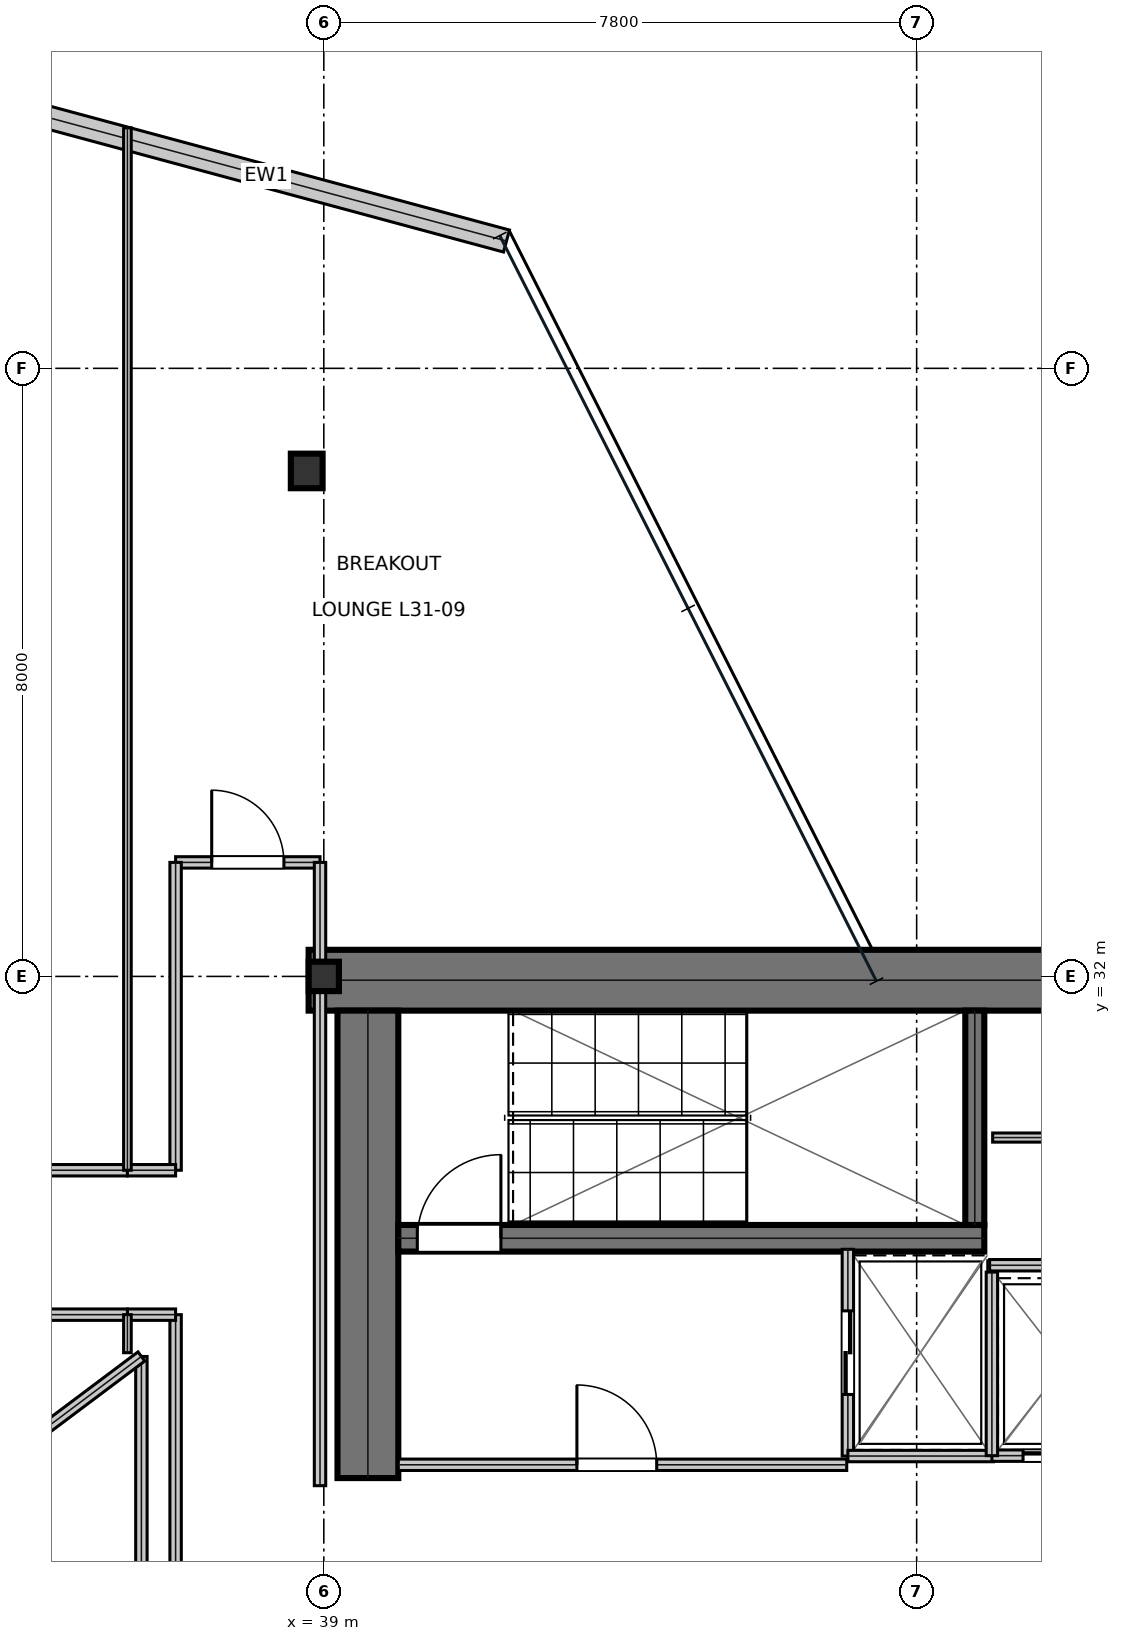
"""IFC4 building model, lengths in metres.
Left out: names, types, materials, properties, quantities, classifications, styles, units other than length and angle.
Written with IfcOpenShell. Run it as: python <this file> out.ifc"""

import sys

from ifc_helpers import new_model, si_unit, direction, frame, frame_2d, origin, origin_2d, place, context, subcontext, project, spatial, rectangle, i_section, extrude, element, fill, save


model = new_model("IFC4")
c1 = context("Model", 3, precision=1e-05, world=origin(), true_north=direction((0.0, 1.0)))
c2 = subcontext(c1, "Body", "Model", "MODEL_VIEW")
j1 = project(units=[si_unit("LENGTHUNIT", "METRE"), si_unit("PLANEANGLEUNIT", "RADIAN")], contexts=[c1])
p1 = place(None, origin())
s1 = spatial("IfcSite", under=j1, at=p1, CompositionType="ELEMENT")
p2 = place(p1, origin())
s2 = spatial("IfcBuilding", under=s1, at=p2, CompositionType="ELEMENT")
p3 = place(p2, frame((0.0, 0.0, 137.1)))
s3 = spatial("IfcBuildingStorey", under=s2, at=p3, CompositionType="ELEMENT", Elevation=137.1)
p4 = place(p3, frame((38.8, 31.95, 0.0), z_axis=(0.0, 0.0, 1.0), x_axis=(1.0, 0.0, 0.0)))
e1 = element("IfcWall", 1, at=p4, inside=s3, PredefinedType="SHEAR", context=c2, shape_type="SweptSolid", body=[
    extrude(rectangle(XDim=16.0, YDim=0.8, at=frame_2d((8.0, 0.0))), origin(), (0.0, 0.0, 1.0), 3.81),
])
p5 = place(p3, frame((39.58, 25.4, 0.0), z_axis=(0.0, 0.0, 1.0), x_axis=(0.0, 1.0, 0.0)))
e2 = element("IfcWall", 2, at=p5, inside=s3, PredefinedType="SHEAR", context=c2, shape_type="SweptSolid", body=[
    extrude(rectangle(XDim=6.15, YDim=0.8, at=frame_2d((3.075, 0.0))), origin(), (0.0, 0.0, 1.0), 3.81),
])
p6 = place(p3, frame((39.98, 28.555, 0.0), z_axis=(0.0, 0.0, 1.0), x_axis=(1.0, 0.0, 0.0)))
e3 = element("IfcWall", 3, at=p6, inside=s3, PredefinedType="SHEAR", context=c2, shape_type="SweptSolid", body=[
    extrude(rectangle(XDim=7.71, YDim=0.35, at=frame_2d((3.855, 0.0))), origin(), (0.0, 0.0, 1.0), 3.81),
])
p7 = place(p6, frame((0.25, 0.0, 0.0)))
e4 = element("IfcOpeningElement", 4, at=p7, cuts=e3, PredefinedType="OPENING", context=c2, shape_type="SweptSolid", body=[
    extrude(rectangle(XDim=1.1, YDim=2.15, at=frame_2d((0.55, 1.075))), frame((0.0, 0.185, 0.0), z_axis=(0.0, -1.0, 0.0), x_axis=(1.0, 0.0, 0.0)), (0.0, 0.0, 1.0), 0.37),
])
p8 = place(p3, frame((47.565, 28.73, 0.0), z_axis=(0.0, 0.0, 1.0), x_axis=(0.0, 1.0, 0.0)))
e5 = element("IfcWall", 5, at=p8, inside=s3, PredefinedType="SHEAR", context=c2, shape_type="SweptSolid", body=[
    extrude(rectangle(XDim=2.82, YDim=0.25, at=frame_2d((1.41, 0.0))), origin(), (0.0, 0.0, 1.0), 3.81),
])
p9 = place(p3, frame((39.0, 32.0, 0.0), z_axis=(0.0, 0.0, 1.0), x_axis=(1.0, 0.0, 0.0)))
e6 = element("IfcColumn", 6, at=p9, inside=s3, PredefinedType="COLUMN", context=c2, shape_type="SweptSolid", body=[
    extrude(i_section(OverallWidth=0.398, OverallDepth=0.387, WebThickness=0.021, FlangeThickness=0.033, at=origin_2d()), origin(), (0.0, 0.0, 1.0), 4.044),
])
p10 = place(p3, frame((38.775, 38.65, 0.016), z_axis=(-0.006193166635, -0.037280434452, 0.9992856518), x_axis=(0.986480631929, -0.163877889995, 0.0)))
e7 = element("IfcColumn", 7, at=p10, inside=s3, PredefinedType="COLUMN", context=c2, shape_type="SweptSolid", body=[
    extrude(i_section(OverallWidth=0.418, OverallDepth=0.455, WebThickness=0.042, FlangeThickness=0.068, at=origin_2d()), origin(), (0.0, 0.0, 1.0), 4.021),
])
p11 = place(p3, frame((41.404, 41.675, 0.0), z_axis=(0.0, 0.0, 1.0), x_axis=(-0.965531145086, 0.260287548434, 0.0)))
e8 = element("IfcWall", 8, at=p11, inside=s3, PredefinedType="STANDARD", context=c2, shape_type="SweptSolid", body=[
    extrude(rectangle(XDim=6.551, YDim=0.3, at=frame_2d((3.275, 0.0))), origin(), (0.0, 0.0, 1.0), 3.81),
])
p12 = place(p3, frame((39.98, 25.575, 0.0), z_axis=(0.0, 0.0, 1.0), x_axis=(1.0, 0.0, 0.0)))
e9 = element("IfcWall", 9, at=p12, inside=s3, PredefinedType="PARTITIONING", context=c2, shape_type="SweptSolid", body=[
    extrude(rectangle(XDim=5.9, YDim=0.15, at=frame_2d((2.95, 0.0))), origin(), (0.0, 0.0, 1.0), 3.81),
])
p13 = place(p12, frame((2.35, 0.0, 0.0)))
e10 = element("IfcOpeningElement", 10, at=p13, cuts=e9, PredefinedType="OPENING", context=c2, shape_type="SweptSolid", body=[
    extrude(rectangle(XDim=1.05, YDim=2.15, at=frame_2d((0.525, 1.075))), frame((0.0, 0.085, 0.0), z_axis=(0.0, -1.0, 0.0), x_axis=(1.0, 0.0, 0.0)), (0.0, 0.0, 1.0), 0.17),
])
p14 = place(p3, frame((45.895, 25.69, 0.0), z_axis=(0.0, 0.0, 1.0), x_axis=(0.0, 1.0, 0.0)))
e11 = element("IfcWall", 11, at=p14, inside=s3, PredefinedType="PARTITIONING", context=c2, shape_type="SweptSolid", body=[
    extrude(rectangle(XDim=2.72, YDim=0.15, at=frame_2d((1.36, 0.0))), origin(), (0.0, 0.0, 1.0), 3.81),
])
p15 = place(p14, frame((0.81, 0.0, 0.0)))
e12 = element("IfcOpeningElement", 12, at=p15, cuts=e11, PredefinedType="OPENING", context=c2, shape_type="SweptSolid", body=[
    extrude(rectangle(XDim=1.1, YDim=2.15, at=frame_2d((0.55, 1.075))), frame((0.0, 0.085, 0.0), z_axis=(0.0, -1.0, 0.0), x_axis=(1.0, 0.0, 0.0)), (0.0, 0.0, 1.0), 0.17),
])
p16 = place(p3, frame((45.895, 25.69, 0.0), z_axis=(0.0, 0.0, 1.0), x_axis=(1.0, 0.0, 0.0)))
e13 = element("IfcWall", 13, at=p16, inside=s3, PredefinedType="PARTITIONING", context=c2, shape_type="SweptSolid", body=[
    extrude(rectangle(XDim=1.915, YDim=0.15, at=frame_2d((0.958, 0.0))), origin(), (0.0, 0.0, 1.0), 3.81),
])
p17 = place(p3, frame((47.79, 25.695, 0.0), z_axis=(0.0, 0.0, 1.0), x_axis=(1.0, 0.0, 0.0)))
e14 = element("IfcWall", 14, at=p17, inside=s3, PredefinedType="PARTITIONING", context=c2, shape_type="SweptSolid", body=[
    extrude(rectangle(XDim=1.92, YDim=0.15, at=frame_2d((0.96, 0.0))), origin(), (0.0, 0.0, 1.0), 3.81),
])
p18 = place(p17, frame((0.41, 0.0, 0.0)))
e15 = element("IfcOpeningElement", 15, at=p18, cuts=e14, PredefinedType="OPENING", context=c2, shape_type="SweptSolid", body=[
    extrude(rectangle(XDim=1.1, YDim=2.15, at=frame_2d((0.55, 1.075))), frame((0.0, 0.085, 0.0), z_axis=(0.0, -1.0, 0.0), x_axis=(1.0, 0.0, 0.0)), (0.0, 0.0, 1.0), 0.17),
])
p19 = place(p3, frame((47.79, 25.695, 0.0), z_axis=(0.0, 0.0, 1.0), x_axis=(0.0, 1.0, 0.0)))
e16 = element("IfcWall", 16, at=p19, inside=s3, PredefinedType="PARTITIONING", context=c2, shape_type="SweptSolid", body=[
    extrude(rectangle(XDim=2.415, YDim=0.15, at=frame_2d((1.208, 0.0))), origin(), (0.0, 0.0, 1.0), 3.81),
])
p20 = place(p3, frame((47.76, 28.2, 0.0), z_axis=(0.0, 0.0, 1.0), x_axis=(1.0, 0.0, 0.0)))
e17 = element("IfcWall", 17, at=p20, inside=s3, PredefinedType="PARTITIONING", context=c2, shape_type="SweptSolid", body=[
    extrude(rectangle(XDim=1.99, YDim=0.15, at=frame_2d((0.995, 0.0))), origin(), (0.0, 0.0, 1.0), 3.81),
])
p21 = place(p3, frame((47.8, 29.88, 0.0), z_axis=(0.0, 0.0, 1.0), x_axis=(1.0, 0.0, 0.0)))
e18 = element("IfcWall", 18, at=p21, inside=s3, PredefinedType="PARTITIONING", context=c2, shape_type="SweptSolid", body=[
    extrude(rectangle(XDim=5.86, YDim=0.12, at=frame_2d((2.93, 0.0))), origin(), (0.0, 0.0, 1.0), 3.81),
])
p22 = place(p21, frame((2.5, 0.0, 0.0)))
e19 = element("IfcOpeningElement", 19, at=p22, cuts=e18, PredefinedType="OPENING", context=c2, shape_type="SweptSolid", body=[
    extrude(rectangle(XDim=0.85, YDim=2.15, at=frame_2d((0.425, 1.075))), frame((0.0, 0.07, 0.0), z_axis=(0.0, -1.0, 0.0), x_axis=(1.0, 0.0, 0.0)), (0.0, 0.0, 1.0), 0.14),
])
p23 = place(p3, frame((37.05, 33.5, 0.0), z_axis=(0.0, 0.0, 1.0), x_axis=(1.0, 0.0, 0.0)))
e20 = element("IfcWall", 20, at=p23, inside=s3, PredefinedType="PARTITIONING", context=c2, shape_type="SweptSolid", body=[
    extrude(rectangle(XDim=1.9, YDim=0.15, at=frame_2d((0.95, 0.0))), origin(), (0.0, 0.0, 1.0), 3.19),
])
p24 = place(p23, frame((0.475, 0.0, 0.0)))
e21 = element("IfcOpeningElement", 21, at=p24, cuts=e20, PredefinedType="OPENING", context=c2, shape_type="SweptSolid", body=[
    extrude(rectangle(XDim=0.95, YDim=2.15, at=frame_2d((0.475, 1.075))), frame((0.0, 0.085, 0.0), z_axis=(0.0, -1.0, 0.0), x_axis=(1.0, 0.0, 0.0)), (0.0, 0.0, 1.0), 0.17),
])
p25 = place(p3, frame((37.05, 14.5, 0.0), z_axis=(0.0, 0.0, 1.0), x_axis=(0.0, 1.0, 0.0)))
e22 = element("IfcWall", 22, at=p25, inside=s3, PredefinedType="PARTITIONING", context=c2, shape_type="SweptSolid", body=[
    extrude(rectangle(XDim=13.05, YDim=0.15, at=frame_2d((6.525, 0.0))), origin(), (0.0, 0.0, 1.0), 3.19),
])
p26 = place(p3, frame((36.416, 27.55, 0.0), z_axis=(0.0, 0.0, 1.0), x_axis=(1.0, 0.0, 0.0)))
e23 = element("IfcWall", 23, at=p26, inside=s3, PredefinedType="PARTITIONING", context=c2, shape_type="SweptSolid", body=[
    extrude(rectangle(XDim=0.634, YDim=0.15, at=frame_2d((0.317, 0.0))), origin(), (0.0, 0.0, 1.0), 3.443),
])
for number, where, z_axis, x_axis in (
    (24, (29.4, 27.55, 0.0), (0.0, 0.0, 1.0), (1.0, 0.0, 0.0)),
    (25, (29.4, 29.45, 0.0), (0.0, 0.0, 1.0), (1.0, 0.0, 0.0)),
):
    element("IfcWall", number, at=place(p3, frame(where, z_axis=z_axis, x_axis=x_axis)), inside=s3, PredefinedType="PARTITIONING", context=c2, shape_type="SweptSolid", body=[
        extrude(rectangle(XDim=7.016, YDim=0.15, at=frame_2d((3.508, 0.0))), origin(), (0.0, 0.0, 1.0), 3.19),
    ])
p27 = place(p3, frame((38.95, 25.3, 0.0), z_axis=(0.0, 0.0, 1.0), x_axis=(0.0, 1.0, 0.0)))
e26 = element("IfcWall", 26, at=p27, inside=s3, PredefinedType="PARTITIONING", context=c2, shape_type="SweptSolid", body=[
    extrude(rectangle(XDim=8.2, YDim=0.15, at=frame_2d((4.1, 0.0))), origin(), (0.0, 0.0, 1.0), 3.19),
])
p28 = place(p3, frame((37.05, 29.45, 0.0), z_axis=(0.0, 0.0, 1.0), x_axis=(0.0, 1.0, 0.0)))
e27 = element("IfcWall", 27, at=p28, inside=s3, PredefinedType="PARTITIONING", context=c2, shape_type="SweptSolid", body=[
    extrude(rectangle(XDim=4.05, YDim=0.15, at=frame_2d((2.025, 0.0))), origin(), (0.0, 0.0, 1.0), 3.19),
])
p29 = place(p3, frame((36.416, 29.45, 0.0), z_axis=(0.0, 0.0, 1.0), x_axis=(1.0, 0.0, 0.0)))
e28 = element("IfcWall", 28, at=p29, inside=s3, PredefinedType="PARTITIONING", context=c2, shape_type="SweptSolid", body=[
    extrude(rectangle(XDim=0.634, YDim=0.15, at=frame_2d((0.317, 0.0))), origin(), (0.0, 0.0, 1.0), 3.81),
])
p30 = place(p3, frame((36.416, 27.05, 0.0), z_axis=(0.0, 0.0, 1.0), x_axis=(0.0, 1.0, 0.0)))
e29 = element("IfcWall", 29, at=p30, inside=s3, PredefinedType="PARTITIONING", context=c2, shape_type="SweptSolid", body=[
    extrude(rectangle(XDim=0.5, YDim=0.1, at=frame_2d((0.25, 0.0))), origin(), (0.0, 0.0, 1.0), 3.81),
])
p31 = place(p3, frame((36.416, 29.45, 0.0), z_axis=(0.0, 0.0, 1.0), x_axis=(0.0, 1.0, 0.0)))
e30 = element("IfcWall", 30, at=p31, inside=s3, PredefinedType="PARTITIONING", context=c2, shape_type="SweptSolid", body=[
    extrude(rectangle(XDim=13.714, YDim=0.1, at=frame_2d((6.857, 0.0))), origin(), (0.0, 0.0, 1.0), 3.19),
])
p32 = place(p3, frame((36.6, 21.0, 0.0), z_axis=(0.0, 0.0, 1.0), x_axis=(0.0, 1.0, 0.0)))
e31 = element("IfcWall", 31, at=p32, inside=s3, PredefinedType="MOVABLE", context=c2, shape_type="SweptSolid", body=[
    extrude(rectangle(XDim=6.0, YDim=0.15, at=frame_2d((3.0, 0.0))), origin(), (0.0, 0.0, 1.0), 3.81),
])
p33 = place(p3, frame((36.6, 27.0, 0.0), z_axis=(0.0, 0.0, 1.0), x_axis=(-0.8, -0.6, 0.0)))
e32 = element("IfcWall", 32, at=p33, inside=s3, PredefinedType="MOVABLE", context=c2, shape_type="SweptSolid", body=[
    extrude(rectangle(XDim=5.0, YDim=0.15, at=frame_2d((2.5, 0.0))), origin(), (0.0, 0.0, 1.0), 3.81),
])
p34 = place(p13, origin())
e33 = element("IfcDoor", 33, at=p34, inside=s3, OperationType="SINGLE_SWING_LEFT", PredefinedType="DOOR", context=c2, shape_type="SweptSolid", body=[
    extrude(rectangle(XDim=1.05, YDim=2.15, at=frame_2d((0.525, 1.075))), frame((0.0, 0.025, 0.0), z_axis=(0.0, -1.0, 0.0), x_axis=(1.0, 0.0, 0.0)), (0.0, 0.0, 1.0), 0.05),
])
fill(e10, e33)
p35 = place(p15, frame((1.1, 0.0, 0.0), z_axis=(0.0, 0.0, 1.0), x_axis=(-1.0, 0.0, 0.0)))
e34 = element("IfcDoor", 34, at=p35, inside=s3, OperationType="DOUBLE_DOOR_SLIDING", PredefinedType="DOOR", context=c2, shape_type="SweptSolid", body=[
    extrude(rectangle(XDim=1.1, YDim=2.15, at=frame_2d((0.55, 1.075))), frame((0.0, 0.025, 0.0), z_axis=(0.0, -1.0, 0.0), x_axis=(1.0, 0.0, 0.0)), (0.0, 0.0, 1.0), 0.05),
])
fill(e12, e34)
p36 = place(p18, frame((1.1, 0.0, 0.0), z_axis=(0.0, 0.0, 1.0), x_axis=(-1.0, 0.0, 0.0)))
e35 = element("IfcDoor", 35, at=p36, inside=s3, OperationType="DOUBLE_DOOR_SLIDING", PredefinedType="DOOR", context=c2, shape_type="SweptSolid", body=[
    extrude(rectangle(XDim=1.1, YDim=2.15, at=frame_2d((0.55, 1.075))), frame((0.0, 0.025, 0.0), z_axis=(0.0, -1.0, 0.0), x_axis=(1.0, 0.0, 0.0)), (0.0, 0.0, 1.0), 0.05),
])
fill(e15, e35)
p37 = place(p24, origin())
e36 = element("IfcDoor", 36, at=p37, inside=s3, OperationType="SINGLE_SWING_LEFT", PredefinedType="DOOR", context=c2, shape_type="SweptSolid", body=[
    extrude(rectangle(XDim=0.95, YDim=2.15, at=frame_2d((0.475, 1.075))), frame((0.0, 0.025, 0.0), z_axis=(0.0, -1.0, 0.0), x_axis=(1.0, 0.0, 0.0)), (0.0, 0.0, 1.0), 0.05),
])
fill(e21, e36)
p38 = place(p7, origin())
e37 = element("IfcDoor", 37, at=p38, inside=s3, OperationType="SINGLE_SWING_RIGHT", PredefinedType="DOOR", context=c2, shape_type="SweptSolid", body=[
    extrude(rectangle(XDim=1.1, YDim=2.15, at=frame_2d((0.55, 1.075))), frame((0.0, 0.025, 0.0), z_axis=(0.0, -1.0, 0.0), x_axis=(1.0, 0.0, 0.0)), (0.0, 0.0, 1.0), 0.05),
])
fill(e4, e37)
save(model, sys.argv[1])
